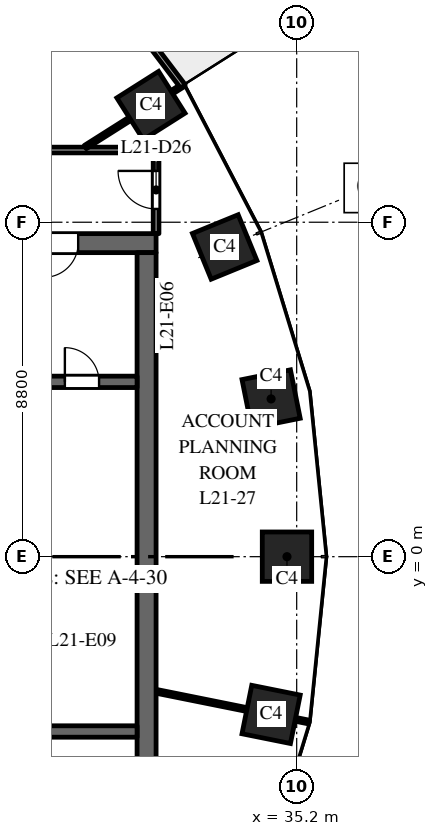
"""IFC4 building model, lengths in metres.
Left out: names, types, materials, properties, quantities, classifications, styles, units other than length and angle.
Written with IfcOpenShell. Run it as: python <this file> out.ifc"""

import sys

from ifc_helpers import new_model, si_unit, direction, frame, frame_2d, origin, origin_2d, place, context, subcontext, project, spatial, rectangle, extrude, element, fill, save


model = new_model("IFC4")
c1 = context("Model", 3, precision=1e-05, world=origin(), true_north=direction((0.0, 1.0)))
c2 = subcontext(c1, "Body", "Model", "MODEL_VIEW")
j1 = project(units=[si_unit("LENGTHUNIT", "METRE"), si_unit("PLANEANGLEUNIT", "RADIAN")], contexts=[c1])
p1 = place(None, origin())
s1 = spatial("IfcSite", under=j1, at=p1, CompositionType="ELEMENT")
p2 = place(p1, origin())
s2 = spatial("IfcBuilding", under=s1, at=p2, CompositionType="ELEMENT")
p3 = place(p2, frame((0.0, 0.0, 96.0)))
s3 = spatial("IfcBuildingStorey", under=s2, at=p3, CompositionType="ELEMENT", Elevation=96.0)
for number, where, z_axis, x_axis in (
    (1, (34.945, 0.0, 0.0), (0.0, 0.0, 1.0), (0.0, 1.0, 0.0)),
    (2, (34.527, 4.151, 0.0), (0.0, 0.0, 1.0), (-0.197, 0.98, 0.0)),
    (3, (33.305, 8.149, 0.0), (0.0, 0.0, 1.0), (-0.379, 0.925, 0.0)),
    (4, (31.365, 11.871, 0.0), (0.0, 0.0, 1.0), (-0.535, 0.845, 0.0)),
    (5, (34.527, -4.151, 0.0), (0.0, 0.0, 1.0), (0.197, 0.98, 0.0)),
):
    element("IfcColumn", number, at=place(p3, frame(where, z_axis=z_axis, x_axis=x_axis)), inside=s3, PredefinedType="COLUMN", context=c2, shape_type="SweptSolid", body=[
        extrude(rectangle(XDim=1.3, YDim=1.3, at=origin_2d()), origin(), (0.0, 0.0, 1.0), 4.0),
    ])
p4 = place(p3, frame((16.5, 8.25, 0.0), z_axis=(0.0, 0.0, 1.0), x_axis=(1.0, 0.0, 0.0)))
e6 = element("IfcWall", 6, at=p4, inside=s3, PredefinedType="SHEAR", context=c2, shape_type="SweptSolid", body=[
    extrude(rectangle(XDim=15.0, YDim=0.5, at=frame_2d((7.5, 0.0))), origin(), (0.0, 0.0, 1.0), 3.7),
])
p5 = place(p4, frame((6.9, 0.0, 0.0)))
e7 = element("IfcOpeningElement", 7, at=p5, cuts=e6, PredefinedType="OPENING", context=c2, shape_type="SweptSolid", body=[
    extrude(rectangle(XDim=1.2, YDim=2.1, at=frame_2d((0.6, 1.05))), frame((0.0, 0.26, 0.0), z_axis=(0.0, -1.0, 0.0), x_axis=(1.0, 0.0, 0.0)), (0.0, 0.0, 1.0), 0.52),
])
p6 = place(p4, frame((12.05, 0.0, 0.0)))
e8 = element("IfcOpeningElement", 8, at=p6, cuts=e6, PredefinedType="OPENING", context=c2, shape_type="SweptSolid", body=[
    extrude(rectangle(XDim=0.9, YDim=2.1, at=frame_2d((0.45, 1.05))), frame((0.0, 0.26, 0.0), z_axis=(0.0, -1.0, 0.0), x_axis=(1.0, 0.0, 0.0)), (0.0, 0.0, 1.0), 0.52),
])
p7 = place(p3, frame((31.25, -8.0, 0.0), z_axis=(0.0, 0.0, 1.0), x_axis=(0.0, 1.0, 0.0)))
e9 = element("IfcWall", 9, at=p7, inside=s3, PredefinedType="SHEAR", context=c2, shape_type="SweptSolid", body=[
    extrude(rectangle(XDim=16.0, YDim=0.5, at=frame_2d((8.0, 0.0))), origin(), (0.0, 0.0, 1.0), 3.7),
])
p8 = place(p3, frame((24.9, 4.6, 0.0), z_axis=(0.0, 0.0, 1.0), x_axis=(1.0, 0.0, 0.0)))
e10 = element("IfcWall", 10, at=p8, inside=s3, PredefinedType="SHEAR", context=c2, shape_type="SweptSolid", body=[
    extrude(rectangle(XDim=6.1, YDim=0.3, at=frame_2d((3.05, 0.0))), origin(), (0.0, 0.0, 1.0), 3.7),
])
p9 = place(p8, frame((4.2, 0.0, 0.0)))
e11 = element("IfcOpeningElement", 11, at=p9, cuts=e10, PredefinedType="OPENING", context=c2, shape_type="SweptSolid", body=[
    extrude(rectangle(XDim=0.9, YDim=2.1, at=frame_2d((0.45, 1.05))), frame((0.0, 0.16, 0.0), z_axis=(0.0, -1.0, 0.0), x_axis=(1.0, 0.0, 0.0)), (0.0, 0.0, 1.0), 0.32),
])
p10 = place(p3, frame((24.9, -4.6, 0.0), z_axis=(0.0, 0.0, 1.0), x_axis=(1.0, 0.0, 0.0)))
e12 = element("IfcWall", 12, at=p10, inside=s3, PredefinedType="SHEAR", context=c2, shape_type="SweptSolid", body=[
    extrude(rectangle(XDim=6.1, YDim=0.3, at=frame_2d((3.05, 0.0))), origin(), (0.0, 0.0, 1.0), 3.7),
])
p11 = place(p3, frame((32.208, 12.374, 0.0), z_axis=(0.0, 0.0, 1.0), x_axis=(-0.604045763106, 0.796949632081, 0.0)))
e13 = element("IfcWall", 13, at=p11, inside=s3, PredefinedType="STANDARD", context=c2, shape_type="SweptSolid", body=[
    extrude(rectangle(XDim=4.423, YDim=0.15, at=frame_2d((2.212, 0.0))), origin(), (0.0, 0.0, 1.0), 3.7),
])
p12 = place(p11, frame((1.712, 0.0, 0.0)))
e14 = element("IfcOpeningElement", 14, at=p12, cuts=e13, PredefinedType="OPENING", context=c2, shape_type="SweptSolid", body=[
    extrude(rectangle(XDim=1.0, YDim=2.4, at=frame_2d((0.5, 1.2))), frame((0.0, 0.085, 0.0), z_axis=(0.0, -1.0, 0.0), x_axis=(1.0, 0.0, 0.0)), (0.0, 0.0, 1.0), 0.17),
])
p13 = place(p3, frame((23.011, 10.7, 0.0), z_axis=(0.0, 0.0, 1.0), x_axis=(1.0, 0.0, 0.0)))
e15 = element("IfcWall", 15, at=p13, inside=s3, PredefinedType="PARTITIONING", context=c2, shape_type="SweptSolid", body=[
    extrude(rectangle(XDim=8.489, YDim=0.15, at=frame_2d((4.245, 0.0))), origin(), (0.0, 0.0, 1.0), 2.9),
])
p14 = place(p13, frame((2.61, 0.0, 0.0)))
e16 = element("IfcOpeningElement", 16, at=p14, cuts=e15, PredefinedType="OPENING", context=c2, shape_type="SweptSolid", body=[
    extrude(rectangle(XDim=1.0, YDim=2.1, at=frame_2d((0.5, 1.05))), frame((0.0, 0.085, 0.0), z_axis=(0.0, -1.0, 0.0), x_axis=(1.0, 0.0, 0.0)), (0.0, 0.0, 1.0), 0.17),
])
p15 = place(p3, frame((29.637, 10.777, 0.0), z_axis=(0.0, 0.0, 1.0), x_axis=(0.844810627195, 0.535065420467, 0.0)))
e17 = element("IfcWall", 17, at=p15, inside=s3, PredefinedType="PARTITIONING", context=c2, shape_type="SweptSolid", body=[
    extrude(rectangle(XDim=3.048, YDim=0.1, at=frame_2d((1.524, 0.0))), origin(), (0.0, 0.0, 1.0), 2.9),
])
p16 = place(p3, frame((31.5, -3.542, 0.0), z_axis=(0.0, 0.0, 1.0), x_axis=(0.980357474535, -0.197228857227, 0.0)))
e18 = element("IfcWall", 18, at=p16, inside=s3, PredefinedType="PARTITIONING", context=c2, shape_type="SweptSolid", body=[
    extrude(rectangle(XDim=4.092, YDim=0.1, at=frame_2d((2.046, 0.0))), origin(), (0.0, 0.0, 1.0), 2.9),
])
p17 = place(p3, frame((31.5, 8.5, 0.0), z_axis=(0.0, 0.0, 1.0), x_axis=(0.0, 1.0, 0.0)))
e19 = element("IfcWall", 19, at=p17, inside=s3, PredefinedType="PARTITIONING", context=c2, shape_type="SweptSolid", body=[
    extrude(rectangle(XDim=2.2, YDim=0.15, at=frame_2d((1.1, 0.0))), origin(), (0.0, 0.0, 1.0), 2.9),
])
p18 = place(p17, frame((0.65, 0.0, 0.0)))
e20 = element("IfcOpeningElement", 20, at=p18, cuts=e19, PredefinedType="OPENING", context=c2, shape_type="SweptSolid", body=[
    extrude(rectangle(XDim=1.0, YDim=2.1, at=frame_2d((0.5, 1.05))), frame((0.0, 0.085, 0.0), z_axis=(0.0, -1.0, 0.0), x_axis=(1.0, 0.0, 0.0)), (0.0, 0.0, 1.0), 0.17),
])
p19 = place(p6, origin())
e21 = element("IfcDoor", 21, at=p19, inside=s3, OperationType="SINGLE_SWING_LEFT", PredefinedType="DOOR", context=c2, shape_type="SweptSolid", body=[
    extrude(rectangle(XDim=0.9, YDim=2.1, at=frame_2d((0.45, 1.05))), frame((0.0, 0.025, 0.0), z_axis=(0.0, -1.0, 0.0), x_axis=(1.0, 0.0, 0.0)), (0.0, 0.0, 1.0), 0.05),
])
fill(e8, e21)
p20 = place(p9, origin())
e22 = element("IfcDoor", 22, at=p20, inside=s3, OperationType="SINGLE_SWING_RIGHT", PredefinedType="DOOR", context=c2, shape_type="SweptSolid", body=[
    extrude(rectangle(XDim=0.9, YDim=2.1, at=frame_2d((0.45, 1.05))), frame((0.0, 0.025, 0.0), z_axis=(0.0, -1.0, 0.0), x_axis=(1.0, 0.0, 0.0)), (0.0, 0.0, 1.0), 0.05),
])
fill(e11, e22)
p21 = place(p18, origin())
e23 = element("IfcDoor", 23, at=p21, inside=s3, OperationType="SINGLE_SWING_RIGHT", PredefinedType="DOOR", context=c2, shape_type="SweptSolid", body=[
    extrude(rectangle(XDim=1.0, YDim=2.1, at=frame_2d((0.5, 1.05))), frame((0.0, 0.025, 0.0), z_axis=(0.0, -1.0, 0.0), x_axis=(1.0, 0.0, 0.0)), (0.0, 0.0, 1.0), 0.05),
])
fill(e20, e23)
save(model, sys.argv[1])
